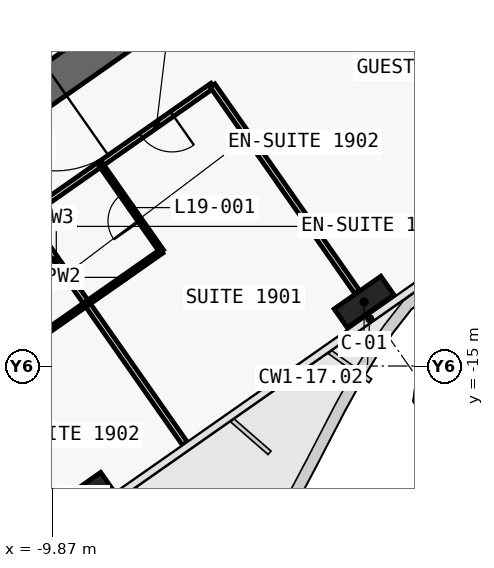
"""IFC4 building model, lengths in metres.
Left out: names, types, materials, properties, quantities, classifications, styles, units other than length and angle.
Written with IfcOpenShell. Run it as: python <this file> out.ifc"""

import sys

from ifc_helpers import new_model, si_unit, direction, frame, frame_2d, origin, origin_2d, place, context, subcontext, project, spatial, polyline, rectangle, outline, extrude, element, fill, save


model = new_model("IFC4")
c1 = context("Model", 3, precision=1e-05, world=origin(), true_north=direction((0.0, 1.0)))
c2 = subcontext(c1, "Body", "Model", "MODEL_VIEW")
j1 = project(units=[si_unit("LENGTHUNIT", "METRE"), si_unit("PLANEANGLEUNIT", "RADIAN")], contexts=[c1])
p1 = place(None, origin())
s1 = spatial("IfcSite", under=j1, at=p1, CompositionType="ELEMENT")
p2 = place(p1, origin())
s2 = spatial("IfcBuilding", under=s1, at=p2, CompositionType="ELEMENT")
p3 = place(p2, frame((0.0, 0.0, 94.1)))
s3 = spatial("IfcBuildingStorey", under=s2, at=p3, CompositionType="ELEMENT", Elevation=94.1)
p4 = place(p3, frame((0.037, 11.867, 0.0), z_axis=(0.0, 0.0, 1.0), x_axis=(-0.819155306259, -0.573571777746, 0.0)))
e1 = element("IfcWall", 1, at=p4, inside=s3, PredefinedType="SHEAR", context=c2, shape_type="SweptSolid", body=[
    extrude(outline(polyline([(33.837, 0.5), (0.7, 0.5), (0.0, -0.5), (33.837, -0.5), (33.837, 0.5)])), origin(), (0.0, 0.0, 1.0), 3.6),
])
p5 = place(p3, frame((0.037, -0.585, 0.0), z_axis=(0.0, 0.0, 1.0), x_axis=(-0.819157152511, -0.573569140985, 0.0)))
e2 = element("IfcWall", 2, at=p5, inside=s3, PredefinedType="SHEAR", context=c2, shape_type="SweptSolid", body=[
    extrude(outline(polyline([(26.695, 0.5), (0.7, 0.5), (0.0, -0.5), (26.695, -0.5), (26.695, 0.5)])), origin(), (0.0, 0.0, 1.0), 3.6),
])
p6 = place(p5, frame((2.995, 0.0, 0.0)))
e3 = element("IfcOpeningElement", 3, at=p6, cuts=e2, PredefinedType="OPENING", context=c2, shape_type="SweptSolid", body=[
    extrude(rectangle(XDim=2.4, YDim=2.1, at=frame_2d((1.2, 1.05))), frame((0.0, 0.51, 0.0), z_axis=(0.0, -1.0, 0.0), x_axis=(1.0, 0.0, 0.0)), (0.0, 0.0, 1.0), 1.02),
])
p7 = place(p5, frame((11.995, 0.0, 0.0)))
e4 = element("IfcOpeningElement", 4, at=p7, cuts=e2, PredefinedType="OPENING", context=c2, shape_type="SweptSolid", body=[
    extrude(rectangle(XDim=2.4, YDim=2.1, at=frame_2d((1.2, 1.05))), frame((0.0, 0.51, 0.0), z_axis=(0.0, -1.0, 0.0), x_axis=(1.0, 0.0, 0.0)), (0.0, 0.0, 1.0), 1.02),
])
p8 = place(p3, frame((-2.638, 3.768, 0.0), z_axis=(0.0, 0.0, 1.0), x_axis=(-0.819148977158, -0.573580816643, 0.0)))
e5 = element("IfcWall", 5, at=p8, inside=s3, PredefinedType="SHEAR", context=c2, shape_type="SweptSolid", body=[
    extrude(outline(polyline([(26.0, 0.25), (0.0, 0.25), (0.0, -0.25), (26.0, -0.25), (26.0, 0.25)])), origin(), (0.0, 0.0, 1.0), 3.6),
])
p9 = place(p8, frame((1.169, 0.0, 0.0)))
e6 = element("IfcOpeningElement", 6, at=p9, cuts=e5, PredefinedType="OPENING", context=c2, shape_type="SweptSolid", body=[
    extrude(rectangle(XDim=1.1, YDim=2.1, at=frame_2d((0.55, 1.05))), frame((0.0, 0.26, 0.0), z_axis=(0.0, -1.0, 0.0), x_axis=(1.0, 0.0, 0.0)), (0.0, 0.0, 1.0), 0.52),
])
p10 = place(p8, frame((3.206, 0.0, 0.0)))
e7 = element("IfcOpeningElement", 7, at=p10, cuts=e5, PredefinedType="OPENING", context=c2, shape_type="SweptSolid", body=[
    extrude(rectangle(XDim=1.1, YDim=2.1, at=frame_2d((0.55, 1.05))), frame((0.0, 0.26, 0.0), z_axis=(0.0, -1.0, 0.0), x_axis=(1.0, 0.0, 0.0)), (0.0, 0.0, 1.0), 0.52),
])
p11 = place(p8, frame((5.244, 0.0, 0.0)))
e8 = element("IfcOpeningElement", 8, at=p11, cuts=e5, PredefinedType="OPENING", context=c2, shape_type="SweptSolid", body=[
    extrude(rectangle(XDim=1.1, YDim=2.1, at=frame_2d((0.55, 1.05))), frame((0.0, 0.26, 0.0), z_axis=(0.0, -1.0, 0.0), x_axis=(1.0, 0.0, 0.0)), (0.0, 0.0, 1.0), 0.52),
])
p12 = place(p8, frame((7.281, 0.0, 0.0)))
e9 = element("IfcOpeningElement", 9, at=p12, cuts=e5, PredefinedType="OPENING", context=c2, shape_type="SweptSolid", body=[
    extrude(rectangle(XDim=1.1, YDim=2.1, at=frame_2d((0.55, 1.05))), frame((0.0, 0.26, 0.0), z_axis=(0.0, -1.0, 0.0), x_axis=(1.0, 0.0, 0.0)), (0.0, 0.0, 1.0), 0.52),
])
p13 = place(p8, frame((9.688, 0.0, 0.0)))
e10 = element("IfcOpeningElement", 10, at=p13, cuts=e5, PredefinedType="OPENING", context=c2, shape_type="SweptSolid", body=[
    extrude(rectangle(XDim=1.1, YDim=2.1, at=frame_2d((0.55, 1.05))), frame((0.0, 0.26, 0.0), z_axis=(0.0, -1.0, 0.0), x_axis=(1.0, 0.0, 0.0)), (0.0, 0.0, 1.0), 0.52),
])
p14 = place(p8, frame((11.863, 0.0, 0.0)))
e11 = element("IfcOpeningElement", 11, at=p14, cuts=e5, PredefinedType="OPENING", context=c2, shape_type="SweptSolid", body=[
    extrude(rectangle(XDim=1.1, YDim=2.1, at=frame_2d((0.55, 1.05))), frame((0.0, 0.26, 0.0), z_axis=(0.0, -1.0, 0.0), x_axis=(1.0, 0.0, 0.0)), (0.0, 0.0, 1.0), 0.52),
])
p15 = place(p8, frame((14.038, 0.0, 0.0)))
e12 = element("IfcOpeningElement", 12, at=p15, cuts=e5, PredefinedType="OPENING", context=c2, shape_type="SweptSolid", body=[
    extrude(rectangle(XDim=1.1, YDim=2.1, at=frame_2d((0.55, 1.05))), frame((0.0, 0.26, 0.0), z_axis=(0.0, -1.0, 0.0), x_axis=(1.0, 0.0, 0.0)), (0.0, 0.0, 1.0), 0.52),
])
p16 = place(p8, frame((16.212, 0.0, 0.0)))
e13 = element("IfcOpeningElement", 13, at=p16, cuts=e5, PredefinedType="OPENING", context=c2, shape_type="SweptSolid", body=[
    extrude(rectangle(XDim=1.1, YDim=2.1, at=frame_2d((0.55, 1.05))), frame((0.0, 0.26, 0.0), z_axis=(0.0, -1.0, 0.0), x_axis=(1.0, 0.0, 0.0)), (0.0, 0.0, 1.0), 0.52),
])
for number, where, z_axis, x_axis in (
    (14, (-1.665, -13.313, 0.0), (0.0, 0.0, 1.0), (-0.819, -0.574, 0.0)),
    (15, (-9.038, -18.475, 0.0), (0.0, 0.0, 1.0), (-0.819, -0.574, 0.0)),
):
    element("IfcColumn", number, at=place(p3, frame(where, z_axis=z_axis, x_axis=x_axis)), inside=s3, PredefinedType="COLUMN", context=c2, shape_type="SweptSolid", body=[
        extrude(rectangle(XDim=1.5, YDim=0.6, at=origin_2d()), origin(), (0.0, 0.0, 1.0), 3.6),
    ])
p17 = place(p3, frame((-5.652, -7.62, 0.0), z_axis=(0.0, 0.0, 1.0), x_axis=(-0.819149096931, -0.573580645591, 0.0)))
e16 = element("IfcWall", 16, at=p17, inside=s3, PredefinedType="PARTITIONING", context=c2, shape_type="SweptSolid", body=[
    extrude(rectangle(XDim=3.601, YDim=0.15, at=frame_2d((1.8, 0.0))), origin(), (0.0, 0.0, 1.0), 2.6),
])
p18 = place(p17, frame((1.3, 0.0, 0.0)))
e17 = element("IfcOpeningElement", 17, at=p18, cuts=e16, PredefinedType="OPENING", context=c2, shape_type="SweptSolid", body=[
    extrude(rectangle(XDim=1.0, YDim=2.1, at=frame_2d((0.5, 1.05))), frame((0.0, 0.085, 0.0), z_axis=(0.0, -1.0, 0.0), x_axis=(1.0, 0.0, 0.0)), (0.0, 0.0, 1.0), 0.17),
])
p19 = place(p3, frame((-8.599, -9.683, 0.0), z_axis=(0.0, 0.0, 1.0), x_axis=(-0.819146032251, -0.573585022335, 0.0)))
e18 = element("IfcWall", 18, at=p19, inside=s3, PredefinedType="PARTITIONING", context=c2, shape_type="SweptSolid", body=[
    extrude(rectangle(XDim=2.404, YDim=0.15, at=frame_2d((1.202, 0.0))), origin(), (0.0, 0.0, 1.0), 3.32),
])
p20 = place(p3, frame((-1.849, -13.051, 0.0), z_axis=(0.0, 0.0, 1.0), x_axis=(-0.573575988258, 0.819152358047, 0.0)))
e19 = element("IfcWall", 19, at=p20, inside=s3, PredefinedType="PARTITIONING", context=c2, shape_type="SweptSolid", body=[
    extrude(rectangle(XDim=6.632, YDim=0.15, at=frame_2d((3.316, 0.0))), origin(), (0.0, 0.0, 1.0), 2.6),
])
p21 = place(p3, frame((-8.96, -13.355, 0.0), z_axis=(0.0, 0.0, 1.0), x_axis=(0.819188907105, 0.573523787192, 0.0)))
e20 = element("IfcWall", 20, at=p21, inside=s3, PredefinedType="PARTITIONING", context=c2, shape_type="SweptSolid", body=[
    extrude(rectangle(XDim=2.4, YDim=0.12, at=frame_2d((1.2, 0.0))), origin(), (0.0, 0.0, 1.0), 3.32),
])
p22 = place(p3, frame((-6.994, -11.978, 0.0), z_axis=(0.0, 0.0, 1.0), x_axis=(-0.573550118428, 0.819170471667, 0.0)))
e21 = element("IfcWall", 21, at=p22, inside=s3, PredefinedType="PARTITIONING", context=c2, shape_type="SweptSolid", body=[
    extrude(rectangle(XDim=2.8, YDim=0.12, at=frame_2d((1.4, 0.0))), origin(), (0.0, 0.0, 1.0), 3.32),
])
p23 = place(p22, frame((0.975, 0.0, 0.0)))
e22 = element("IfcOpeningElement", 22, at=p23, cuts=e21, PredefinedType="OPENING", context=c2, shape_type="SweptSolid", body=[
    extrude(rectangle(XDim=0.85, YDim=2.05, at=frame_2d((0.425, 1.025))), frame((0.0, 0.07, 0.0), z_axis=(0.0, -1.0, 0.0), x_axis=(1.0, 0.0, 0.0)), (0.0, 0.0, 1.0), 0.14),
])
p24 = place(p3, frame((-6.379, -17.041, 0.0), z_axis=(0.0, 0.0, 1.0), x_axis=(-0.573564311442, 0.819160534108, 0.0)))
e23 = element("IfcWall", 23, at=p24, inside=s3, PredefinedType="PARTITIONING", context=c2, shape_type="SweptSolid", body=[
    extrude(rectangle(XDim=4.499, YDim=0.15, at=frame_2d((2.25, 0.0))), origin(), (0.0, 0.0, 1.0), 2.5),
])
p25 = place(p3, frame((-8.96, -13.355, 0.0), z_axis=(0.0, 0.0, 1.0), x_axis=(-0.573608623498, 0.819129505664, 0.0)))
e24 = element("IfcWall", 24, at=p25, inside=s3, PredefinedType="PARTITIONING", context=c2, shape_type="SweptSolid", body=[
    extrude(rectangle(XDim=2.8, YDim=0.15, at=frame_2d((1.4, 0.0))), origin(), (0.0, 0.0, 1.0), 3.32),
])
p26 = place(p3, frame((-10.926, -14.732, 0.0), z_axis=(0.0, 0.0, 1.0), x_axis=(0.819107643868, 0.573639841501, 0.0)))
e25 = element("IfcWall", 25, at=p26, inside=s3, PredefinedType="PARTITIONING", context=c2, shape_type="SweptSolid", body=[
    extrude(rectangle(XDim=2.4, YDim=0.12, at=frame_2d((1.2, 0.0))), origin(), (0.0, 0.0, 1.0), 3.32),
])
p27 = place(p7, origin())
e26 = element("IfcDoor", 26, at=p27, inside=s3, OperationType="DOUBLE_DOOR_SINGLE_SWING", PredefinedType="DOOR", context=c2, shape_type="SweptSolid", body=[
    extrude(rectangle(XDim=2.4, YDim=2.1, at=frame_2d((1.2, 1.05))), frame((0.0, 0.025, 0.0), z_axis=(0.0, -1.0, 0.0), x_axis=(1.0, 0.0, 0.0)), (0.0, 0.0, 1.0), 0.05),
])
fill(e4, e26)
p28 = place(p23, origin())
e27 = element("IfcDoor", 27, at=p28, inside=s3, OperationType="SINGLE_SWING_LEFT", PredefinedType="DOOR", context=c2, shape_type="SweptSolid", body=[
    extrude(rectangle(XDim=0.85, YDim=2.05, at=frame_2d((0.425, 1.025))), frame((0.0, 0.025, 0.0), z_axis=(0.0, -1.0, 0.0), x_axis=(1.0, 0.0, 0.0)), (0.0, 0.0, 1.0), 0.05),
])
fill(e22, e27)
p29 = place(p18, origin())
e28 = element("IfcDoor", 28, at=p29, inside=s3, OperationType="SINGLE_SWING_RIGHT", PredefinedType="DOOR", context=c2, shape_type="SweptSolid", body=[
    extrude(rectangle(XDim=1.0, YDim=2.1, at=frame_2d((0.5, 1.05))), frame((0.0, 0.025, 0.0), z_axis=(0.0, -1.0, 0.0), x_axis=(1.0, 0.0, 0.0)), (0.0, 0.0, 1.0), 0.05),
])
fill(e17, e28)
save(model, sys.argv[1])
